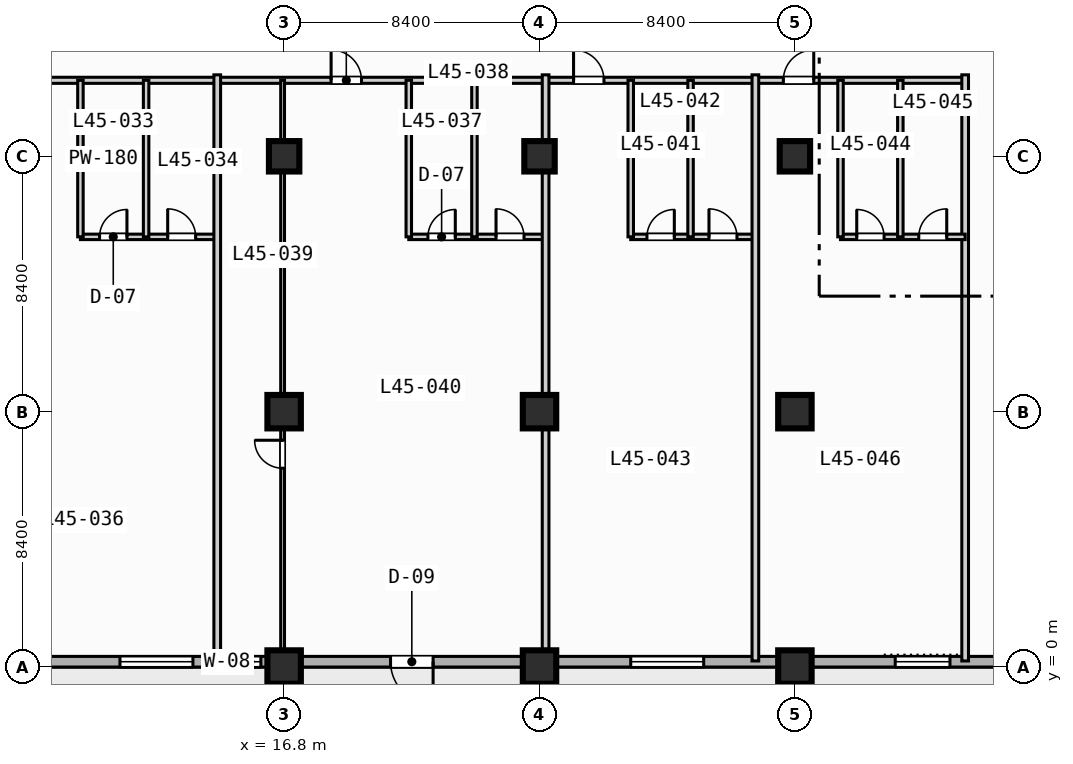
"""IFC4 building model, lengths in metres.
Left out: names, types, materials, properties, quantities, classifications, styles, units other than length and angle.
Written with IfcOpenShell. Run it as: python <this file> out.ifc"""

import sys

from ifc_helpers import new_model, si_unit, direction, frame, frame_2d, origin, origin_2d, place, context, subcontext, project, spatial, rectangle, extrude, element, fill, save


model = new_model("IFC4")
c1 = context("Model", 3, precision=1e-05, world=origin(), true_north=direction((0.0, 1.0)))
c2 = subcontext(c1, "Body", "Model", "MODEL_VIEW")
j1 = project(units=[si_unit("LENGTHUNIT", "METRE"), si_unit("PLANEANGLEUNIT", "RADIAN")], contexts=[c1])
p1 = place(None, origin())
s1 = spatial("IfcSite", under=j1, at=p1, CompositionType="ELEMENT")
p2 = place(p1, origin())
s2 = spatial("IfcBuilding", under=s1, at=p2, CompositionType="ELEMENT")
p3 = place(p2, frame((0.0, 0.0, 186.5)))
s3 = spatial("IfcBuildingStorey", under=s2, at=p3, CompositionType="ELEMENT", Elevation=186.5)
for number, where, z_axis, x_axis in (
    (1, (16.8, 0.0, 0.0), (0.0, 0.0, 1.0), (1.0, 0.0, 0.0)),
    (2, (16.8, 8.4, 0.0), (0.0, 0.0, 1.0), (1.0, 0.0, 0.0)),
):
    element("IfcColumn", number, at=place(p3, frame(where, z_axis=z_axis, x_axis=x_axis)), inside=s3, PredefinedType="COLUMN", context=c2, shape_type="SweptSolid", body=[
        extrude(rectangle(XDim=1.1, YDim=1.1, at=origin_2d()), origin(), (0.0, 0.0, 1.0), 3.7),
    ])
p4 = place(p3, frame((16.8, 16.8, 0.0), z_axis=(0.0, 0.0, 1.0), x_axis=(1.0, 0.0, 0.0)))
e3 = element("IfcColumn", 3, at=p4, inside=s3, PredefinedType="COLUMN", context=c2, shape_type="SweptSolid", body=[
    extrude(rectangle(XDim=1.0, YDim=1.0, at=origin_2d()), origin(), (0.0, 0.0, 1.0), 3.7),
])
for number, where, z_axis, x_axis in (
    (4, (25.2, 0.0, 0.0), (0.0, 0.0, 1.0), (1.0, 0.0, 0.0)),
    (5, (25.2, 8.4, 0.0), (0.0, 0.0, 1.0), (1.0, 0.0, 0.0)),
):
    element("IfcColumn", number, at=place(p3, frame(where, z_axis=z_axis, x_axis=x_axis)), inside=s3, PredefinedType="COLUMN", context=c2, shape_type="SweptSolid", body=[
        extrude(rectangle(XDim=1.1, YDim=1.1, at=origin_2d()), origin(), (0.0, 0.0, 1.0), 3.7),
    ])
p5 = place(p3, frame((25.2, 16.8, 0.0), z_axis=(0.0, 0.0, 1.0), x_axis=(1.0, 0.0, 0.0)))
e6 = element("IfcColumn", 6, at=p5, inside=s3, PredefinedType="COLUMN", context=c2, shape_type="SweptSolid", body=[
    extrude(rectangle(XDim=1.0, YDim=1.0, at=origin_2d()), origin(), (0.0, 0.0, 1.0), 3.7),
])
for number, where, z_axis, x_axis in (
    (7, (33.6, 0.0, 0.0), (0.0, 0.0, 1.0), (1.0, 0.0, 0.0)),
    (8, (33.6, 8.4, 0.0), (0.0, 0.0, 1.0), (1.0, 0.0, 0.0)),
):
    element("IfcColumn", number, at=place(p3, frame(where, z_axis=z_axis, x_axis=x_axis)), inside=s3, PredefinedType="COLUMN", context=c2, shape_type="SweptSolid", body=[
        extrude(rectangle(XDim=1.1, YDim=1.1, at=origin_2d()), origin(), (0.0, 0.0, 1.0), 3.7),
    ])
p6 = place(p3, frame((33.6, 16.8, 0.0), z_axis=(0.0, 0.0, 1.0), x_axis=(1.0, 0.0, 0.0)))
e9 = element("IfcColumn", 9, at=p6, inside=s3, PredefinedType="COLUMN", context=c2, shape_type="SweptSolid", body=[
    extrude(rectangle(XDim=1.0, YDim=1.0, at=origin_2d()), origin(), (0.0, 0.0, 1.0), 3.7),
])
p7 = place(p3, frame((72.425, 0.175, 0.0), z_axis=(0.0, 0.0, 1.0), x_axis=(-1.0, 0.0, 0.0)))
e10 = element("IfcWall", 10, at=p7, inside=s3, PredefinedType="STANDARD", context=c2, shape_type="SweptSolid", body=[
    extrude(rectangle(XDim=69.25, YDim=0.35, at=frame_2d((34.625, 0.0))), origin(), (0.0, 0.0, 1.0), 3.47),
])
p8 = place(p7, frame((50.725, 0.0, 0.0)))
e11 = element("IfcOpeningElement", 11, at=p8, cuts=e10, PredefinedType="OPENING", context=c2, shape_type="SweptSolid", body=[
    extrude(rectangle(XDim=1.4, YDim=2.2, at=frame_2d((0.7, 1.1))), frame((0.0, 0.185, 0.0), z_axis=(0.0, -1.0, 0.0), x_axis=(1.0, 0.0, 0.0)), (0.0, 0.0, 1.0), 0.37),
])
p9 = place(p7, frame((58.625, 0.0, 0.85)))
e12 = element("IfcOpeningElement", 12, at=p9, cuts=e10, PredefinedType="OPENING", context=c2, shape_type="SweptSolid", body=[
    extrude(rectangle(XDim=2.4, YDim=1.95, at=frame_2d((1.2, 0.975))), frame((0.0, 0.185, 0.0), z_axis=(0.0, -1.0, 0.0), x_axis=(1.0, 0.0, 0.0)), (0.0, 0.0, 1.0), 0.37),
])
p10 = place(p7, frame((41.825, 0.0, 0.85)))
e13 = element("IfcOpeningElement", 13, at=p10, cuts=e10, PredefinedType="OPENING", context=c2, shape_type="SweptSolid", body=[
    extrude(rectangle(XDim=2.4, YDim=1.95, at=frame_2d((1.2, 0.975))), frame((0.0, 0.185, 0.0), z_axis=(0.0, -1.0, 0.0), x_axis=(1.0, 0.0, 0.0)), (0.0, 0.0, 1.0), 0.37),
])
p11 = place(p7, frame((33.725, 0.0, 0.85)))
e14 = element("IfcOpeningElement", 14, at=p11, cuts=e10, PredefinedType="OPENING", context=c2, shape_type="SweptSolid", body=[
    extrude(rectangle(XDim=1.8, YDim=1.8, at=frame_2d((0.9, 0.9))), frame((0.0, 0.185, 0.0), z_axis=(0.0, -1.0, 0.0), x_axis=(1.0, 0.0, 0.0)), (0.0, 0.0, 1.0), 0.37),
])
p12 = place(p7, frame((25.025, 0.0, 0.85)))
e15 = element("IfcOpeningElement", 15, at=p12, cuts=e10, PredefinedType="OPENING", context=c2, shape_type="SweptSolid", body=[
    extrude(rectangle(XDim=2.4, YDim=1.95, at=frame_2d((1.2, 0.975))), frame((0.0, 0.185, 0.0), z_axis=(0.0, -1.0, 0.0), x_axis=(1.0, 0.0, 0.0)), (0.0, 0.0, 1.0), 0.37),
])
p13 = place(p7, frame((67.075, 0.0, 0.85)))
e16 = element("IfcOpeningElement", 16, at=p13, cuts=e10, PredefinedType="OPENING", context=c2, shape_type="SweptSolid", body=[
    extrude(rectangle(XDim=1.8, YDim=1.8, at=frame_2d((0.9, 0.9))), frame((0.0, 0.185, 0.0), z_axis=(0.0, -1.0, 0.0), x_axis=(1.0, 0.0, 0.0)), (0.0, 0.0, 1.0), 0.37),
])
p14 = place(p7, frame((56.39, 0.0, 0.85)))
e17 = element("IfcOpeningElement", 17, at=p14, cuts=e10, PredefinedType="OPENING", context=c2, shape_type="SweptSolid", body=[
    extrude(rectangle(XDim=0.72, YDim=1.8, at=frame_2d((0.36, 0.9))), frame((0.0, 0.185, 0.0), z_axis=(0.0, -1.0, 0.0), x_axis=(1.0, 0.0, 0.0)), (0.0, 0.0, 1.0), 0.37),
])
p15 = place(p7, frame((9.075, 0.0, 0.85)))
e18 = element("IfcOpeningElement", 18, at=p15, cuts=e10, PredefinedType="OPENING", context=c2, shape_type="SweptSolid", body=[
    extrude(rectangle(XDim=1.8, YDim=1.8, at=frame_2d((0.9, 0.9))), frame((0.0, 0.185, 0.0), z_axis=(0.0, -1.0, 0.0), x_axis=(1.0, 0.0, 0.0)), (0.0, 0.0, 1.0), 0.37),
])
p16 = place(p7, frame((2.675, 0.0, 0.85)))
e19 = element("IfcOpeningElement", 19, at=p16, cuts=e10, PredefinedType="OPENING", context=c2, shape_type="SweptSolid", body=[
    extrude(rectangle(XDim=1.8, YDim=1.8, at=frame_2d((0.9, 0.9))), frame((0.0, 0.185, 0.0), z_axis=(0.0, -1.0, 0.0), x_axis=(1.0, 0.0, 0.0)), (0.0, 0.0, 1.0), 0.37),
])
p17 = place(p3, frame((3.4, 19.3, 0.0), z_axis=(0.0, 0.0, 1.0), x_axis=(1.0, 0.0, 0.0)))
e20 = element("IfcWall", 20, at=p17, inside=s3, PredefinedType="PARTITIONING", context=c2, shape_type="SweptSolid", body=[
    extrude(rectangle(XDim=35.8, YDim=0.2, at=frame_2d((17.9, 0.0))), origin(), (0.0, 0.0, 1.0), 3.47),
])
p18 = place(p17, frame((3.92, 0.0, 0.0)))
e21 = element("IfcOpeningElement", 21, at=p18, cuts=e20, PredefinedType="OPENING", context=c2, shape_type="SweptSolid", body=[
    extrude(rectangle(XDim=1.0, YDim=2.15, at=frame_2d((0.5, 1.075))), frame((0.0, 0.11, 0.0), z_axis=(0.0, -1.0, 0.0), x_axis=(1.0, 0.0, 0.0)), (0.0, 0.0, 1.0), 0.22),
])
p19 = place(p17, frame((14.945, 0.0, 0.0)))
e22 = element("IfcOpeningElement", 22, at=p19, cuts=e20, PredefinedType="OPENING", context=c2, shape_type="SweptSolid", body=[
    extrude(rectangle(XDim=1.0, YDim=2.15, at=frame_2d((0.5, 1.075))), frame((0.0, 0.11, 0.0), z_axis=(0.0, -1.0, 0.0), x_axis=(1.0, 0.0, 0.0)), (0.0, 0.0, 1.0), 0.22),
])
p20 = place(p17, frame((22.92, 0.0, 0.0)))
e23 = element("IfcOpeningElement", 23, at=p20, cuts=e20, PredefinedType="OPENING", context=c2, shape_type="SweptSolid", body=[
    extrude(rectangle(XDim=1.0, YDim=2.15, at=frame_2d((0.5, 1.075))), frame((0.0, 0.11, 0.0), z_axis=(0.0, -1.0, 0.0), x_axis=(1.0, 0.0, 0.0)), (0.0, 0.0, 1.0), 0.22),
])
p21 = place(p17, frame((29.82, 0.0, 0.0)))
e24 = element("IfcOpeningElement", 24, at=p21, cuts=e20, PredefinedType="OPENING", context=c2, shape_type="SweptSolid", body=[
    extrude(rectangle(XDim=1.0, YDim=2.15, at=frame_2d((0.5, 1.075))), frame((0.0, 0.11, 0.0), z_axis=(0.0, -1.0, 0.0), x_axis=(1.0, 0.0, 0.0)), (0.0, 0.0, 1.0), 0.22),
])
p22 = place(p3, frame((10.1, 14.15, 0.0), z_axis=(0.0, 0.0, 1.0), x_axis=(1.0, 0.0, 0.0)))
e25 = element("IfcWall", 25, at=p22, inside=s3, PredefinedType="PLUMBINGWALL", context=c2, shape_type="SweptSolid", body=[
    extrude(rectangle(XDim=4.5, YDim=0.18, at=frame_2d((2.25, 0.0))), origin(), (0.0, 0.0, 1.0), 3.47),
])
p23 = place(p22, frame((0.63, 0.0, 0.0)))
e26 = element("IfcOpeningElement", 26, at=p23, cuts=e25, PredefinedType="OPENING", context=c2, shape_type="SweptSolid", body=[
    extrude(rectangle(XDim=0.9, YDim=2.1, at=frame_2d((0.45, 1.05))), frame((0.0, 0.1, 0.0), z_axis=(0.0, -1.0, 0.0), x_axis=(1.0, 0.0, 0.0)), (0.0, 0.0, 1.0), 0.2),
])
p24 = place(p22, frame((2.87, 0.0, 0.0)))
e27 = element("IfcOpeningElement", 27, at=p24, cuts=e25, PredefinedType="OPENING", context=c2, shape_type="SweptSolid", body=[
    extrude(rectangle(XDim=0.92, YDim=2.1, at=frame_2d((0.46, 1.05))), frame((0.0, 0.1, 0.0), z_axis=(0.0, -1.0, 0.0), x_axis=(1.0, 0.0, 0.0)), (0.0, 0.0, 1.0), 0.2),
])
for number, where, z_axis, x_axis in (
    (28, (10.1, 14.15, 0.0), (0.0, 0.0, 1.0), (0.0, 1.0, 0.0)),
    (29, (12.26, 14.15, 0.0), (0.0, 0.0, 1.0), (0.0, 1.0, 0.0)),
):
    element("IfcWall", number, at=place(p3, frame(where, z_axis=z_axis, x_axis=x_axis)), inside=s3, PredefinedType="PLUMBINGWALL", context=c2, shape_type="SweptSolid", body=[
        extrude(rectangle(XDim=5.15, YDim=0.18, at=frame_2d((2.575, 0.0))), origin(), (0.0, 0.0, 1.0), 3.47),
    ])
p25 = place(p3, frame((14.6, 0.2, 0.0), z_axis=(0.0, 0.0, 1.0), x_axis=(0.0, 1.0, 0.0)))
e30 = element("IfcWall", 30, at=p25, inside=s3, PredefinedType="PARTITIONING", context=c2, shape_type="SweptSolid", body=[
    extrude(rectangle(XDim=19.28, YDim=0.22, at=frame_2d((9.64, 0.0))), origin(), (0.0, 0.0, 1.0), 3.47),
])
p26 = place(p3, frame((20.9, 14.15, 0.0), z_axis=(0.0, 0.0, 1.0), x_axis=(1.0, 0.0, 0.0)))
e31 = element("IfcWall", 31, at=p26, inside=s3, PredefinedType="PLUMBINGWALL", context=c2, shape_type="SweptSolid", body=[
    extrude(rectangle(XDim=4.5, YDim=0.18, at=frame_2d((2.25, 0.0))), origin(), (0.0, 0.0, 1.0), 3.47),
])
p27 = place(p26, frame((0.63, 0.0, 0.0)))
e32 = element("IfcOpeningElement", 32, at=p27, cuts=e31, PredefinedType="OPENING", context=c2, shape_type="SweptSolid", body=[
    extrude(rectangle(XDim=0.9, YDim=2.1, at=frame_2d((0.45, 1.05))), frame((0.0, 0.1, 0.0), z_axis=(0.0, -1.0, 0.0), x_axis=(1.0, 0.0, 0.0)), (0.0, 0.0, 1.0), 0.2),
])
p28 = place(p26, frame((2.87, 0.0, 0.0)))
e33 = element("IfcOpeningElement", 33, at=p28, cuts=e31, PredefinedType="OPENING", context=c2, shape_type="SweptSolid", body=[
    extrude(rectangle(XDim=0.92, YDim=2.1, at=frame_2d((0.46, 1.05))), frame((0.0, 0.1, 0.0), z_axis=(0.0, -1.0, 0.0), x_axis=(1.0, 0.0, 0.0)), (0.0, 0.0, 1.0), 0.2),
])
for number, where, z_axis, x_axis in (
    (34, (20.9, 14.15, 0.0), (0.0, 0.0, 1.0), (0.0, 1.0, 0.0)),
    (35, (23.06, 14.15, 0.0), (0.0, 0.0, 1.0), (0.0, 1.0, 0.0)),
):
    element("IfcWall", number, at=place(p3, frame(where, z_axis=z_axis, x_axis=x_axis)), inside=s3, PredefinedType="PLUMBINGWALL", context=c2, shape_type="SweptSolid", body=[
        extrude(rectangle(XDim=5.15, YDim=0.18, at=frame_2d((2.575, 0.0))), origin(), (0.0, 0.0, 1.0), 3.47),
    ])
p29 = place(p3, frame((16.75, 0.35, 0.0), z_axis=(0.0, 0.0, 1.0), x_axis=(0.0, 1.0, 0.0)))
e36 = element("IfcWall", 36, at=p29, inside=s3, PredefinedType="PARTITIONING", context=c2, shape_type="SweptSolid", body=[
    extrude(rectangle(XDim=18.95, YDim=0.125, at=frame_2d((9.475, 0.0))), origin(), (0.0, 0.0, 1.0), 2.82),
])
p30 = place(p29, frame((6.19, 0.0, 0.0)))
e37 = element("IfcOpeningElement", 37, at=p30, cuts=e36, PredefinedType="OPENING", context=c2, shape_type="SweptSolid", body=[
    extrude(rectangle(XDim=0.92, YDim=2.1, at=frame_2d((0.46, 1.05))), frame((0.0, 0.073, 0.0), z_axis=(0.0, -1.0, 0.0), x_axis=(1.0, 0.0, 0.0)), (0.0, 0.0, 1.0), 0.145),
])
p31 = place(p3, frame((25.4, 0.2, 0.0), z_axis=(0.0, 0.0, 1.0), x_axis=(0.0, 1.0, 0.0)))
e38 = element("IfcWall", 38, at=p31, inside=s3, PredefinedType="PARTITIONING", context=c2, shape_type="SweptSolid", body=[
    extrude(rectangle(XDim=19.28, YDim=0.22, at=frame_2d((9.64, 0.0))), origin(), (0.0, 0.0, 1.0), 2.82),
])
p32 = place(p3, frame((28.2, 14.15, 0.0), z_axis=(0.0, 0.0, 1.0), x_axis=(1.0, 0.0, 0.0)))
e39 = element("IfcWall", 39, at=p32, inside=s3, PredefinedType="PLUMBINGWALL", context=c2, shape_type="SweptSolid", body=[
    extrude(rectangle(XDim=4.1, YDim=0.18, at=frame_2d((2.05, 0.0))), origin(), (0.0, 0.0, 1.0), 3.47),
])
p33 = place(p32, frame((0.534, 0.0, 0.0)))
e40 = element("IfcOpeningElement", 40, at=p33, cuts=e39, PredefinedType="OPENING", context=c2, shape_type="SweptSolid", body=[
    extrude(rectangle(XDim=0.9, YDim=2.1, at=frame_2d((0.45, 1.05))), frame((0.0, 0.1, 0.0), z_axis=(0.0, -1.0, 0.0), x_axis=(1.0, 0.0, 0.0)), (0.0, 0.0, 1.0), 0.2),
])
p34 = place(p32, frame((2.574, 0.0, 0.0)))
e41 = element("IfcOpeningElement", 41, at=p34, cuts=e39, PredefinedType="OPENING", context=c2, shape_type="SweptSolid", body=[
    extrude(rectangle(XDim=0.92, YDim=2.1, at=frame_2d((0.46, 1.05))), frame((0.0, 0.1, 0.0), z_axis=(0.0, -1.0, 0.0), x_axis=(1.0, 0.0, 0.0)), (0.0, 0.0, 1.0), 0.2),
])
for number, where, z_axis, x_axis in (
    (42, (28.2, 14.15, 0.0), (0.0, 0.0, 1.0), (0.0, 1.0, 0.0)),
    (43, (30.168, 14.15, 0.0), (0.0, 0.0, 1.0), (0.0, 1.0, 0.0)),
):
    element("IfcWall", number, at=place(p3, frame(where, z_axis=z_axis, x_axis=x_axis)), inside=s3, PredefinedType="PLUMBINGWALL", context=c2, shape_type="SweptSolid", body=[
        extrude(rectangle(XDim=5.15, YDim=0.18, at=frame_2d((2.575, 0.0))), origin(), (0.0, 0.0, 1.0), 3.47),
    ])
for number, where, z_axis, x_axis in (
    (44, (32.3, 0.2, 0.0), (0.0, 0.0, 1.0), (0.0, 1.0, 0.0)),
    (45, (39.2, 0.2, 0.0), (0.0, 0.0, 1.0), (0.0, 1.0, 0.0)),
):
    element("IfcWall", number, at=place(p3, frame(where, z_axis=z_axis, x_axis=x_axis)), inside=s3, PredefinedType="PARTITIONING", context=c2, shape_type="SweptSolid", body=[
        extrude(rectangle(XDim=19.28, YDim=0.22, at=frame_2d((9.64, 0.0))), origin(), (0.0, 0.0, 1.0), 3.47),
    ])
p35 = place(p3, frame((35.1, 14.15, 0.0), z_axis=(0.0, 0.0, 1.0), x_axis=(1.0, 0.0, 0.0)))
e46 = element("IfcWall", 46, at=p35, inside=s3, PredefinedType="PLUMBINGWALL", context=c2, shape_type="SweptSolid", body=[
    extrude(rectangle(XDim=4.1, YDim=0.18, at=frame_2d((2.05, 0.0))), origin(), (0.0, 0.0, 1.0), 3.47),
])
p36 = place(p35, frame((0.534, 0.0, 0.0)))
e47 = element("IfcOpeningElement", 47, at=p36, cuts=e46, PredefinedType="OPENING", context=c2, shape_type="SweptSolid", body=[
    extrude(rectangle(XDim=0.9, YDim=2.1, at=frame_2d((0.45, 1.05))), frame((0.0, 0.1, 0.0), z_axis=(0.0, -1.0, 0.0), x_axis=(1.0, 0.0, 0.0)), (0.0, 0.0, 1.0), 0.2),
])
p37 = place(p35, frame((2.574, 0.0, 0.0)))
e48 = element("IfcOpeningElement", 48, at=p37, cuts=e46, PredefinedType="OPENING", context=c2, shape_type="SweptSolid", body=[
    extrude(rectangle(XDim=0.92, YDim=2.1, at=frame_2d((0.46, 1.05))), frame((0.0, 0.1, 0.0), z_axis=(0.0, -1.0, 0.0), x_axis=(1.0, 0.0, 0.0)), (0.0, 0.0, 1.0), 0.2),
])
for number, where, z_axis, x_axis in (
    (49, (35.1, 14.15, 0.0), (0.0, 0.0, 1.0), (0.0, 1.0, 0.0)),
    (50, (37.068, 14.15, 0.0), (0.0, 0.0, 1.0), (0.0, 1.0, 0.0)),
):
    element("IfcWall", number, at=place(p3, frame(where, z_axis=z_axis, x_axis=x_axis)), inside=s3, PredefinedType="PLUMBINGWALL", context=c2, shape_type="SweptSolid", body=[
        extrude(rectangle(XDim=5.15, YDim=0.18, at=frame_2d((2.575, 0.0))), origin(), (0.0, 0.0, 1.0), 3.47),
    ])
p38 = place(p8, origin())
e51 = element("IfcDoor", 51, at=p38, inside=s3, OperationType="SINGLE_SWING_LEFT", PredefinedType="DOOR", context=c2, shape_type="SweptSolid", body=[
    extrude(rectangle(XDim=1.4, YDim=2.2, at=frame_2d((0.7, 1.1))), frame((0.0, 0.025, 0.0), z_axis=(0.0, -1.0, 0.0), x_axis=(1.0, 0.0, 0.0)), (0.0, 0.0, 1.0), 0.05),
])
fill(e11, e51)
p39 = place(p9, origin())
e52 = element("IfcWindow", 52, at=p39, inside=s3, PartitioningType="SINGLE_PANEL", PredefinedType="WINDOW", context=c2, shape_type="SweptSolid", body=[
    extrude(rectangle(XDim=2.4, YDim=1.95, at=frame_2d((1.2, 0.975))), frame((0.0, 0.03, 0.0), z_axis=(0.0, -1.0, 0.0), x_axis=(1.0, 0.0, 0.0)), (0.0, 0.0, 1.0), 0.06),
])
fill(e12, e52)
p40 = place(p10, origin())
e53 = element("IfcWindow", 53, at=p40, inside=s3, PartitioningType="SINGLE_PANEL", PredefinedType="WINDOW", context=c2, shape_type="SweptSolid", body=[
    extrude(rectangle(XDim=2.4, YDim=1.95, at=frame_2d((1.2, 0.975))), frame((0.0, 0.03, 0.0), z_axis=(0.0, -1.0, 0.0), x_axis=(1.0, 0.0, 0.0)), (0.0, 0.0, 1.0), 0.06),
])
fill(e13, e53)
p41 = place(p11, origin())
e54 = element("IfcWindow", 54, at=p41, inside=s3, PartitioningType="SINGLE_PANEL", PredefinedType="WINDOW", context=c2, shape_type="SweptSolid", body=[
    extrude(rectangle(XDim=1.8, YDim=1.8, at=frame_2d((0.9, 0.9))), frame((0.0, 0.03, 0.0), z_axis=(0.0, -1.0, 0.0), x_axis=(1.0, 0.0, 0.0)), (0.0, 0.0, 1.0), 0.06),
])
fill(e14, e54)
p42 = place(p14, origin())
e55 = element("IfcWindow", 55, at=p42, inside=s3, PartitioningType="SINGLE_PANEL", PredefinedType="WINDOW", context=c2, shape_type="SweptSolid", body=[
    extrude(rectangle(XDim=0.72, YDim=1.8, at=frame_2d((0.36, 0.9))), frame((0.0, 0.03, 0.0), z_axis=(0.0, -1.0, 0.0), x_axis=(1.0, 0.0, 0.0)), (0.0, 0.0, 1.0), 0.06),
])
fill(e17, e55)
p43 = place(p19, origin())
e56 = element("IfcDoor", 56, at=p43, inside=s3, OperationType="SINGLE_SWING_LEFT", PredefinedType="DOOR", context=c2, shape_type="SweptSolid", body=[
    extrude(rectangle(XDim=1.0, YDim=2.15, at=frame_2d((0.5, 1.075))), frame((0.0, 0.025, 0.0), z_axis=(0.0, -1.0, 0.0), x_axis=(1.0, 0.0, 0.0)), (0.0, 0.0, 1.0), 0.05),
])
fill(e22, e56)
p44 = place(p20, origin())
e57 = element("IfcDoor", 57, at=p44, inside=s3, OperationType="SINGLE_SWING_LEFT", PredefinedType="DOOR", context=c2, shape_type="SweptSolid", body=[
    extrude(rectangle(XDim=1.0, YDim=2.15, at=frame_2d((0.5, 1.075))), frame((0.0, 0.025, 0.0), z_axis=(0.0, -1.0, 0.0), x_axis=(1.0, 0.0, 0.0)), (0.0, 0.0, 1.0), 0.05),
])
fill(e23, e57)
p45 = place(p21, origin())
e58 = element("IfcDoor", 58, at=p45, inside=s3, OperationType="SINGLE_SWING_RIGHT", PredefinedType="DOOR", context=c2, shape_type="SweptSolid", body=[
    extrude(rectangle(XDim=1.0, YDim=2.15, at=frame_2d((0.5, 1.075))), frame((0.0, 0.025, 0.0), z_axis=(0.0, -1.0, 0.0), x_axis=(1.0, 0.0, 0.0)), (0.0, 0.0, 1.0), 0.05),
])
fill(e24, e58)
p46 = place(p23, origin())
e59 = element("IfcDoor", 59, at=p46, inside=s3, OperationType="SINGLE_SWING_RIGHT", PredefinedType="DOOR", context=c2, shape_type="SweptSolid", body=[
    extrude(rectangle(XDim=0.9, YDim=2.1, at=frame_2d((0.45, 1.05))), frame((0.0, 0.025, 0.0), z_axis=(0.0, -1.0, 0.0), x_axis=(1.0, 0.0, 0.0)), (0.0, 0.0, 1.0), 0.05),
])
fill(e26, e59)
p47 = place(p24, origin())
e60 = element("IfcDoor", 60, at=p47, inside=s3, OperationType="SINGLE_SWING_LEFT", PredefinedType="DOOR", context=c2, shape_type="SweptSolid", body=[
    extrude(rectangle(XDim=0.92, YDim=2.1, at=frame_2d((0.46, 1.05))), frame((0.0, 0.025, 0.0), z_axis=(0.0, -1.0, 0.0), x_axis=(1.0, 0.0, 0.0)), (0.0, 0.0, 1.0), 0.05),
])
fill(e27, e60)
p48 = place(p27, origin())
e61 = element("IfcDoor", 61, at=p48, inside=s3, OperationType="SINGLE_SWING_RIGHT", PredefinedType="DOOR", context=c2, shape_type="SweptSolid", body=[
    extrude(rectangle(XDim=0.9, YDim=2.1, at=frame_2d((0.45, 1.05))), frame((0.0, 0.025, 0.0), z_axis=(0.0, -1.0, 0.0), x_axis=(1.0, 0.0, 0.0)), (0.0, 0.0, 1.0), 0.05),
])
fill(e32, e61)
p49 = place(p28, origin())
e62 = element("IfcDoor", 62, at=p49, inside=s3, OperationType="SINGLE_SWING_LEFT", PredefinedType="DOOR", context=c2, shape_type="SweptSolid", body=[
    extrude(rectangle(XDim=0.92, YDim=2.1, at=frame_2d((0.46, 1.05))), frame((0.0, 0.025, 0.0), z_axis=(0.0, -1.0, 0.0), x_axis=(1.0, 0.0, 0.0)), (0.0, 0.0, 1.0), 0.05),
])
fill(e33, e62)
p50 = place(p30, origin())
e63 = element("IfcDoor", 63, at=p50, inside=s3, OperationType="SINGLE_SWING_RIGHT", PredefinedType="DOOR", context=c2, shape_type="SweptSolid", body=[
    extrude(rectangle(XDim=0.92, YDim=2.1, at=frame_2d((0.46, 1.05))), frame((0.0, 0.025, 0.0), z_axis=(0.0, -1.0, 0.0), x_axis=(1.0, 0.0, 0.0)), (0.0, 0.0, 1.0), 0.05),
])
fill(e37, e63)
p51 = place(p33, origin())
e64 = element("IfcDoor", 64, at=p51, inside=s3, OperationType="SINGLE_SWING_RIGHT", PredefinedType="DOOR", context=c2, shape_type="SweptSolid", body=[
    extrude(rectangle(XDim=0.9, YDim=2.1, at=frame_2d((0.45, 1.05))), frame((0.0, 0.025, 0.0), z_axis=(0.0, -1.0, 0.0), x_axis=(1.0, 0.0, 0.0)), (0.0, 0.0, 1.0), 0.05),
])
fill(e40, e64)
p52 = place(p34, origin())
e65 = element("IfcDoor", 65, at=p52, inside=s3, OperationType="SINGLE_SWING_LEFT", PredefinedType="DOOR", context=c2, shape_type="SweptSolid", body=[
    extrude(rectangle(XDim=0.92, YDim=2.1, at=frame_2d((0.46, 1.05))), frame((0.0, 0.025, 0.0), z_axis=(0.0, -1.0, 0.0), x_axis=(1.0, 0.0, 0.0)), (0.0, 0.0, 1.0), 0.05),
])
fill(e41, e65)
p53 = place(p36, origin())
e66 = element("IfcDoor", 66, at=p53, inside=s3, OperationType="SINGLE_SWING_LEFT", PredefinedType="DOOR", context=c2, shape_type="SweptSolid", body=[
    extrude(rectangle(XDim=0.9, YDim=2.1, at=frame_2d((0.45, 1.05))), frame((0.0, 0.025, 0.0), z_axis=(0.0, -1.0, 0.0), x_axis=(1.0, 0.0, 0.0)), (0.0, 0.0, 1.0), 0.05),
])
fill(e47, e66)
p54 = place(p37, origin())
e67 = element("IfcDoor", 67, at=p54, inside=s3, OperationType="SINGLE_SWING_RIGHT", PredefinedType="DOOR", context=c2, shape_type="SweptSolid", body=[
    extrude(rectangle(XDim=0.92, YDim=2.1, at=frame_2d((0.46, 1.05))), frame((0.0, 0.025, 0.0), z_axis=(0.0, -1.0, 0.0), x_axis=(1.0, 0.0, 0.0)), (0.0, 0.0, 1.0), 0.05),
])
fill(e48, e67)
save(model, sys.argv[1])
